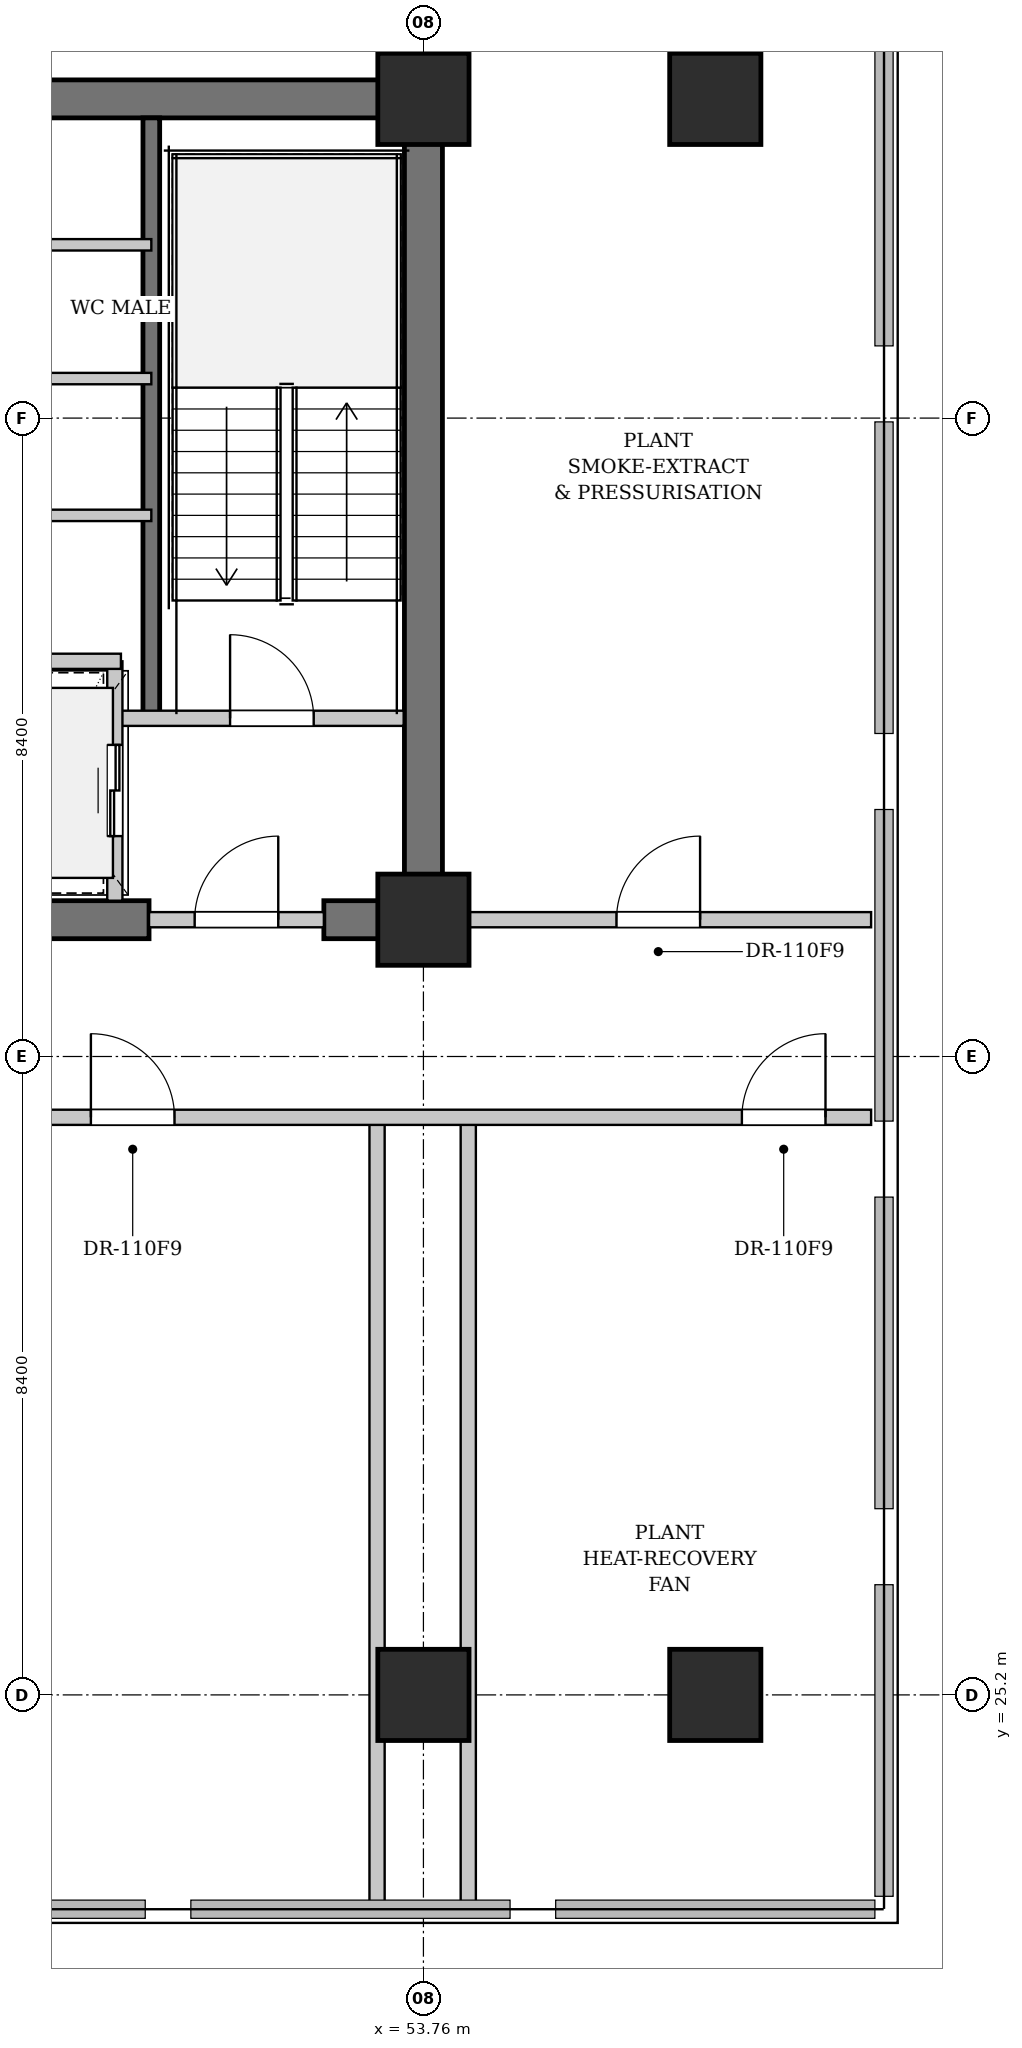
"""IFC4 building model, lengths in metres.
Left out: names, types, materials, properties, quantities, classifications, styles, units other than length and angle.
Written with IfcOpenShell. Run it as: python <this file> out.ifc"""

import sys

from ifc_helpers import new_model, si_unit, direction, frame, frame_2d, origin, origin_2d, place, context, subcontext, project, spatial, rectangle, extrude, element, fill, save


model = new_model("IFC4")
c1 = context("Model", 3, precision=1e-05, world=origin(), true_north=direction((0.0, 1.0)))
c2 = subcontext(c1, "Body", "Model", "MODEL_VIEW")
j1 = project(units=[si_unit("LENGTHUNIT", "METRE"), si_unit("PLANEANGLEUNIT", "RADIAN")], contexts=[c1])
p1 = place(None, origin())
s1 = spatial("IfcSite", under=j1, at=p1, CompositionType="ELEMENT")
p2 = place(p1, origin())
s2 = spatial("IfcBuilding", under=s1, at=p2, CompositionType="ELEMENT")
p3 = place(p2, frame((0.0, 0.0, 85.8)))
s3 = spatial("IfcBuildingStorey", under=s2, at=p3, CompositionType="ELEMENT", Elevation=85.8)
p4 = place(p3, frame((22.79, 46.2, 0.0), z_axis=(0.0, 0.0, 1.0), x_axis=(1.0, 0.0, 0.0)))
e1 = element("IfcWall", 1, at=p4, inside=s3, PredefinedType="SHEAR", context=c2, shape_type="SweptSolid", body=[
    extrude(rectangle(XDim=31.22, YDim=0.5, at=frame_2d((15.61, 0.0))), origin(), (0.0, 0.0, 1.0), 3.48),
])
p5 = place(p3, frame((42.1, 35.4, 0.0), z_axis=(0.0, 0.0, 1.0), x_axis=(1.0, 0.0, 0.0)))
e2 = element("IfcWall", 2, at=p5, inside=s3, PredefinedType="SHEAR", context=c2, shape_type="SweptSolid", body=[
    extrude(rectangle(XDim=8.05, YDim=0.5, at=frame_2d((4.025, 0.0))), origin(), (0.0, 0.0, 1.0), 3.48),
])
p6 = place(p5, frame((4.85, 0.0, 0.0)))
e3 = element("IfcOpeningElement", 3, at=p6, cuts=e2, PredefinedType="OPENING", context=c2, shape_type="SweptSolid", body=[
    extrude(rectangle(XDim=0.9, YDim=2.15, at=frame_2d((0.45, 1.075))), frame((0.0, 0.26, 0.0), z_axis=(0.0, -1.0, 0.0), x_axis=(1.0, 0.0, 0.0)), (0.0, 0.0, 1.0), 0.52),
])
p7 = place(p3, frame((52.45, 35.4, 0.0), z_axis=(0.0, 0.0, 1.0), x_axis=(1.0, 0.0, 0.0)))
e4 = element("IfcWall", 4, at=p7, inside=s3, PredefinedType="SHEAR", context=c2, shape_type="SweptSolid", body=[
    extrude(rectangle(XDim=1.56, YDim=0.5, at=frame_2d((0.78, 0.0))), origin(), (0.0, 0.0, 1.0), 3.48),
])
p8 = place(p3, frame((53.76, 35.65, 0.0), z_axis=(0.0, 0.0, 1.0), x_axis=(0.0, 1.0, 0.0)))
e5 = element("IfcWall", 5, at=p8, inside=s3, PredefinedType="SHEAR", context=c2, shape_type="SweptSolid", body=[
    extrude(rectangle(XDim=10.3, YDim=0.5, at=frame_2d((5.15, 0.0))), origin(), (0.0, 0.0, 1.0), 3.48),
])
p9 = place(p3, frame((50.18, 38.05, 0.0), z_axis=(0.0, 0.0, 1.0), x_axis=(0.0, 1.0, 0.0)))
e6 = element("IfcWall", 6, at=p9, inside=s3, PredefinedType="SHEAR", context=c2, shape_type="SweptSolid", body=[
    extrude(rectangle(XDim=7.9, YDim=0.22, at=frame_2d((3.95, 0.0))), origin(), (0.0, 0.0, 1.0), 3.48),
])
for number, where, z_axis, x_axis in (
    (7, (53.76, 35.4, 0.0), (0.0, 0.0, 1.0), (1.0, 0.0, 0.0)),
    (8, (53.76, 46.2, 0.0), (0.0, 0.0, 1.0), (1.0, 0.0, 0.0)),
    (9, (53.76, 25.2, 0.0), (0.0, 0.0, 1.0), (1.0, 0.0, 0.0)),
    (10, (57.6, 25.2, 0.0), (0.0, 0.0, 1.0), (1.0, 0.0, 0.0)),
    (11, (57.6, 46.2, 0.0), (0.0, 0.0, 1.0), (1.0, 0.0, 0.0)),
):
    element("IfcColumn", number, at=place(p3, frame(where, z_axis=z_axis, x_axis=x_axis)), inside=s3, PredefinedType="COLUMN", context=c2, shape_type="SweptSolid", body=[
        extrude(rectangle(XDim=1.2, YDim=1.2, at=origin_2d()), origin(), (0.0, 0.0, 1.0), 3.9),
    ])
p10 = place(p3, frame((49.78, 38.05, 0.0), z_axis=(0.0, 0.0, 1.0), x_axis=(1.0, 0.0, 0.0)))
e12 = element("IfcWall", 12, at=p10, inside=s3, PredefinedType="PARTITIONING", context=c2, shape_type="SweptSolid", body=[
    extrude(rectangle(XDim=3.72, YDim=0.2, at=frame_2d((1.86, 0.0))), origin(), (0.0, 0.0, 1.0), 3.48),
])
p11 = place(p10, frame((1.436, 0.0, 0.0)))
e13 = element("IfcOpeningElement", 13, at=p11, cuts=e12, PredefinedType="OPENING", context=c2, shape_type="SweptSolid", body=[
    extrude(rectangle(XDim=1.1, YDim=2.15, at=frame_2d((0.55, 1.075))), frame((0.0, 0.11, 0.0), z_axis=(0.0, -1.0, 0.0), x_axis=(1.0, 0.0, 0.0)), (0.0, 0.0, 1.0), 0.22),
])
p12 = place(p3, frame((50.15, 35.4, 0.0), z_axis=(0.0, 0.0, 1.0), x_axis=(1.0, 0.0, 0.0)))
e14 = element("IfcWall", 14, at=p12, inside=s3, PredefinedType="PARTITIONING", context=c2, shape_type="SweptSolid", body=[
    extrude(rectangle(XDim=2.3, YDim=0.2, at=frame_2d((1.15, 0.0))), origin(), (0.0, 0.0, 1.0), 2.565),
])
p13 = place(p12, frame((0.6, 0.0, 0.0)))
e15 = element("IfcOpeningElement", 15, at=p13, cuts=e14, PredefinedType="OPENING", context=c2, shape_type="SweptSolid", body=[
    extrude(rectangle(XDim=1.1, YDim=2.15, at=frame_2d((0.55, 1.075))), frame((0.0, 0.11, 0.0), z_axis=(0.0, -1.0, 0.0), x_axis=(1.0, 0.0, 0.0)), (0.0, 0.0, 1.0), 0.22),
])
p14 = place(p3, frame((49.7, 35.65, 0.0), z_axis=(0.0, 0.0, 1.0), x_axis=(0.0, 1.0, 0.0)))
e16 = element("IfcWall", 16, at=p14, inside=s3, PredefinedType="PARTITIONING", context=c2, shape_type="SweptSolid", body=[
    extrude(rectangle(XDim=3.15, YDim=0.2, at=frame_2d((1.575, 0.0))), origin(), (0.0, 0.0, 1.0), 3.48),
])
p15 = place(p14, frame((0.85, 0.0, 0.0)))
e17 = element("IfcOpeningElement", 17, at=p15, cuts=e16, PredefinedType="OPENING", context=c2, shape_type="SweptSolid", body=[
    extrude(rectangle(XDim=1.2, YDim=2.2, at=frame_2d((0.6, 1.1))), frame((0.0, 0.11, 0.0), z_axis=(0.0, -1.0, 0.0), x_axis=(1.0, 0.0, 0.0)), (0.0, 0.0, 1.0), 0.22),
])
p16 = place(p3, frame((47.92, 38.8, 0.0), z_axis=(0.0, 0.0, 1.0), x_axis=(1.0, 0.0, 0.0)))
e18 = element("IfcWall", 18, at=p16, inside=s3, PredefinedType="PARTITIONING", context=c2, shape_type="SweptSolid", body=[
    extrude(rectangle(XDim=1.86, YDim=0.2, at=frame_2d((0.93, 0.0))), origin(), (0.0, 0.0, 1.0), 3.48),
])
for number, where, z_axis, x_axis in (
    (19, (47.88, 40.72, 0.0), (0.0, 0.0, 1.0), (1.0, 0.0, 0.0)),
    (20, (47.88, 42.52, 0.0), (0.0, 0.0, 1.0), (1.0, 0.0, 0.0)),
    (21, (47.88, 44.28, 0.0), (0.0, 0.0, 1.0), (1.0, 0.0, 0.0)),
):
    element("IfcWall", number, at=place(p3, frame(where, z_axis=z_axis, x_axis=x_axis)), inside=s3, PredefinedType="PARTITIONING", context=c2, shape_type="SweptSolid", body=[
        extrude(rectangle(XDim=2.3, YDim=0.15, at=frame_2d((1.15, 0.0))), origin(), (0.0, 0.0, 1.0), 3.48),
    ])
p17 = place(p3, frame((54.05, 35.4, 0.0), z_axis=(0.0, 0.0, 1.0), x_axis=(1.0, 0.0, 0.0)))
e22 = element("IfcWall", 22, at=p17, inside=s3, PredefinedType="PARTITIONING", context=c2, shape_type="SweptSolid", body=[
    extrude(rectangle(XDim=5.6, YDim=0.2, at=frame_2d((2.8, 0.0))), origin(), (0.0, 0.0, 1.0), 3.48),
])
p18 = place(p17, frame((2.25, 0.0, 0.0)))
e23 = element("IfcOpeningElement", 23, at=p18, cuts=e22, PredefinedType="OPENING", context=c2, shape_type="SweptSolid", body=[
    extrude(rectangle(XDim=1.1, YDim=2.15, at=frame_2d((0.55, 1.075))), frame((0.0, 0.11, 0.0), z_axis=(0.0, -1.0, 0.0), x_axis=(1.0, 0.0, 0.0)), (0.0, 0.0, 1.0), 0.22),
])
p19 = place(p3, frame((53.15, 22.38, 0.0), z_axis=(0.0, 0.0, 1.0), x_axis=(0.0, 1.0, 0.0)))
e24 = element("IfcWall", 24, at=p19, inside=s3, PredefinedType="PARTITIONING", context=c2, shape_type="SweptSolid", body=[
    extrude(rectangle(XDim=10.42, YDim=0.2, at=frame_2d((5.21, 0.0))), origin(), (0.0, 0.0, 1.0), 3.48),
])
p20 = place(p3, frame((54.35, 22.38, 0.0), z_axis=(0.0, 0.0, 1.0), x_axis=(0.0, 1.0, 0.0)))
e25 = element("IfcWall", 25, at=p20, inside=s3, PredefinedType="PARTITIONING", context=c2, shape_type="SweptSolid", body=[
    extrude(rectangle(XDim=10.42, YDim=0.2, at=frame_2d((5.21, 0.0))), origin(), (0.0, 0.0, 1.0), 2.275),
])
p21 = place(p3, frame((17.15, 32.8, 0.0), z_axis=(0.0, 0.0, 1.0), x_axis=(1.0, 0.0, 0.0)))
e26 = element("IfcWall", 26, at=p21, inside=s3, PredefinedType="PARTITIONING", context=c2, shape_type="SweptSolid", body=[
    extrude(rectangle(XDim=42.5, YDim=0.2, at=frame_2d((21.25, 0.0))), origin(), (0.0, 0.0, 1.0), 2.275),
])
p22 = place(p21, frame((0.6, 0.0, 0.0)))
e27 = element("IfcOpeningElement", 27, at=p22, cuts=e26, PredefinedType="OPENING", context=c2, shape_type="SweptSolid", body=[
    extrude(rectangle(XDim=1.1, YDim=2.15, at=frame_2d((0.55, 1.075))), frame((0.0, 0.11, 0.0), z_axis=(0.0, -1.0, 0.0), x_axis=(1.0, 0.0, 0.0)), (0.0, 0.0, 1.0), 0.22),
])
p23 = place(p21, frame((16.862, 0.0, 0.0)))
e28 = element("IfcOpeningElement", 28, at=p23, cuts=e26, PredefinedType="OPENING", context=c2, shape_type="SweptSolid", body=[
    extrude(rectangle(XDim=1.1, YDim=2.15, at=frame_2d((0.55, 1.075))), frame((0.0, 0.11, 0.0), z_axis=(0.0, -1.0, 0.0), x_axis=(1.0, 0.0, 0.0)), (0.0, 0.0, 1.0), 0.22),
])
p24 = place(p21, frame((32.235, 0.0, 0.0)))
e29 = element("IfcOpeningElement", 29, at=p24, cuts=e26, PredefinedType="OPENING", context=c2, shape_type="SweptSolid", body=[
    extrude(rectangle(XDim=1.1, YDim=2.15, at=frame_2d((0.55, 1.075))), frame((0.0, 0.11, 0.0), z_axis=(0.0, -1.0, 0.0), x_axis=(1.0, 0.0, 0.0)), (0.0, 0.0, 1.0), 0.22),
])
p25 = place(p21, frame((40.8, 0.0, 0.0)))
e30 = element("IfcOpeningElement", 30, at=p25, cuts=e26, PredefinedType="OPENING", context=c2, shape_type="SweptSolid", body=[
    extrude(rectangle(XDim=1.1, YDim=2.15, at=frame_2d((0.55, 1.075))), frame((0.0, 0.11, 0.0), z_axis=(0.0, -1.0, 0.0), x_axis=(1.0, 0.0, 0.0)), (0.0, 0.0, 1.0), 0.22),
])
p26 = place(p11, origin())
e31 = element("IfcDoor", 31, at=p26, inside=s3, OperationType="SINGLE_SWING_LEFT", PredefinedType="DOOR", context=c2, shape_type="SweptSolid", body=[
    extrude(rectangle(XDim=1.1, YDim=2.15, at=frame_2d((0.55, 1.075))), frame((0.0, 0.025, 0.0), z_axis=(0.0, -1.0, 0.0), x_axis=(1.0, 0.0, 0.0)), (0.0, 0.0, 1.0), 0.05),
])
fill(e13, e31)
p27 = place(p13, origin())
e32 = element("IfcDoor", 32, at=p27, inside=s3, OperationType="SINGLE_SWING_RIGHT", PredefinedType="DOOR", context=c2, shape_type="SweptSolid", body=[
    extrude(rectangle(XDim=1.1, YDim=2.15, at=frame_2d((0.55, 1.075))), frame((0.0, 0.025, 0.0), z_axis=(0.0, -1.0, 0.0), x_axis=(1.0, 0.0, 0.0)), (0.0, 0.0, 1.0), 0.05),
])
fill(e15, e32)
p28 = place(p15, origin())
e33 = element("IfcDoor", 33, at=p28, inside=s3, OperationType="DOUBLE_DOOR_SLIDING", PredefinedType="DOOR", context=c2, shape_type="SweptSolid", body=[
    extrude(rectangle(XDim=1.2, YDim=2.2, at=frame_2d((0.6, 1.1))), frame((0.0, 0.025, 0.0), z_axis=(0.0, -1.0, 0.0), x_axis=(1.0, 0.0, 0.0)), (0.0, 0.0, 1.0), 0.05),
])
fill(e17, e33)
p29 = place(p18, origin())
e34 = element("IfcDoor", 34, at=p29, inside=s3, OperationType="SINGLE_SWING_RIGHT", PredefinedType="DOOR", context=c2, shape_type="SweptSolid", body=[
    extrude(rectangle(XDim=1.1, YDim=2.15, at=frame_2d((0.55, 1.075))), frame((0.0, 0.025, 0.0), z_axis=(0.0, -1.0, 0.0), x_axis=(1.0, 0.0, 0.0)), (0.0, 0.0, 1.0), 0.05),
])
fill(e23, e34)
p30 = place(p24, origin())
e35 = element("IfcDoor", 35, at=p30, inside=s3, OperationType="SINGLE_SWING_LEFT", PredefinedType="DOOR", context=c2, shape_type="SweptSolid", body=[
    extrude(rectangle(XDim=1.1, YDim=2.15, at=frame_2d((0.55, 1.075))), frame((0.0, 0.025, 0.0), z_axis=(0.0, -1.0, 0.0), x_axis=(1.0, 0.0, 0.0)), (0.0, 0.0, 1.0), 0.05),
])
fill(e29, e35)
p31 = place(p25, origin())
e36 = element("IfcDoor", 36, at=p31, inside=s3, OperationType="SINGLE_SWING_RIGHT", PredefinedType="DOOR", context=c2, shape_type="SweptSolid", body=[
    extrude(rectangle(XDim=1.1, YDim=2.15, at=frame_2d((0.55, 1.075))), frame((0.0, 0.025, 0.0), z_axis=(0.0, -1.0, 0.0), x_axis=(1.0, 0.0, 0.0)), (0.0, 0.0, 1.0), 0.05),
])
fill(e30, e36)
save(model, sys.argv[1])
